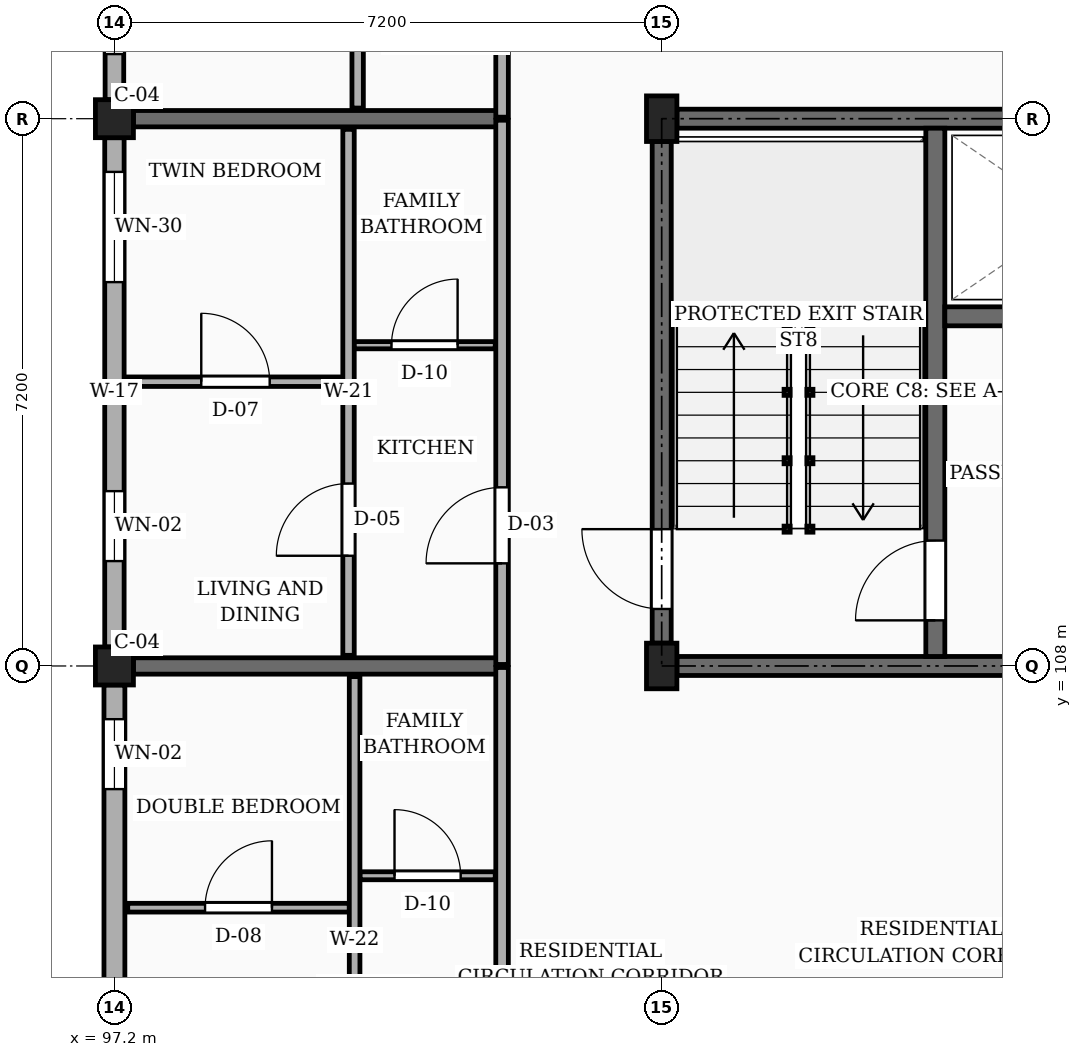
"""IFC4 building model, lengths in metres.
Left out: names, types, materials, properties, quantities, classifications, styles, units other than length and angle.
Written with IfcOpenShell. Run it as: python <this file> out.ifc"""

import sys

from ifc_helpers import new_model, si_unit, direction, frame, frame_2d, origin, origin_2d, place, context, subcontext, project, spatial, rectangle, extrude, element, fill, save


model = new_model("IFC4")
c1 = context("Model", 3, precision=1e-05, world=origin(), true_north=direction((0.0, 1.0)))
c2 = subcontext(c1, "Body", "Model", "MODEL_VIEW")
j1 = project(units=[si_unit("LENGTHUNIT", "METRE"), si_unit("PLANEANGLEUNIT", "RADIAN")], contexts=[c1])
p1 = place(None, origin())
s1 = spatial("IfcSite", under=j1, at=p1, CompositionType="ELEMENT")
p2 = place(p1, origin())
s2 = spatial("IfcBuilding", under=s1, at=p2, CompositionType="ELEMENT")
p3 = place(p2, frame((0.0, 0.0, 29.7)))
s3 = spatial("IfcBuildingStorey", under=s2, at=p3, CompositionType="ELEMENT", Elevation=29.7)
for number, where, z_axis, x_axis in (
    (1, (97.2, 108.0, 0.0), (0.0, 0.0, 1.0), (1.0, 0.0, 0.0)),
    (2, (97.2, 115.2, 0.0), (0.0, 0.0, 1.0), (1.0, 0.0, 0.0)),
):
    element("IfcColumn", number, at=place(p3, frame(where, z_axis=z_axis, x_axis=x_axis)), inside=s3, PredefinedType="COLUMN", context=c2, shape_type="SweptSolid", body=[
        extrude(rectangle(XDim=0.5, YDim=0.5, at=origin_2d()), origin(), (0.0, 0.0, 1.0), 3.15),
    ])
for number, where, z_axis, x_axis in (
    (3, (104.4, 108.0, 0.0), (0.0, 0.0, 1.0), (1.0, 0.0, 0.0)),
    (4, (104.4, 115.2, 0.0), (0.0, 0.0, 1.0), (1.0, 0.0, 0.0)),
):
    element("IfcColumn", number, at=place(p3, frame(where, z_axis=z_axis, x_axis=x_axis)), inside=s3, PredefinedType="COLUMN", context=c2, shape_type="SweptSolid", body=[
        extrude(rectangle(XDim=0.4, YDim=0.6, at=origin_2d()), origin(), (0.0, 0.0, 1.0), 3.15),
    ])
for number, where, z_axis, x_axis in (
    (5, (97.45, 108.0, 0.0), (0.0, 0.0, 1.0), (1.0, 0.0, 0.0)),
    (6, (97.45, 115.2, 0.0), (0.0, 0.0, 1.0), (1.0, 0.0, 0.0)),
):
    element("IfcWall", number, at=place(p3, frame(where, z_axis=z_axis, x_axis=x_axis)), inside=s3, PredefinedType="SOLIDWALL", context=c2, shape_type="SweptSolid", body=[
        extrude(rectangle(XDim=4.85, YDim=0.215, at=frame_2d((2.425, 0.0))), origin(), (0.0, 0.0, 1.0), 2.19),
    ])
p4 = place(p3, frame((97.2, 122.15, 0.0), z_axis=(0.0, 0.0, 1.0), x_axis=(0.0, -1.0, 0.0)))
e7 = element("IfcWall", 7, at=p4, inside=s3, PredefinedType="SOLIDWALL", context=c2, shape_type="SweptSolid", body=[
    extrude(rectangle(XDim=6.7, YDim=0.245, at=frame_2d((3.35, 0.0))), origin(), (0.0, 0.0, 1.0), 2.46),
])
p5 = place(p4, frame((0.45, 0.0, 0.78)))
e8 = element("IfcOpeningElement", 8, at=p5, cuts=e7, PredefinedType="OPENING", context=c2, shape_type="SweptSolid", body=[
    extrude(rectangle(XDim=1.25, YDim=1.44, at=frame_2d((0.625, 0.72))), frame((0.0, 0.133, 0.0), z_axis=(0.0, -1.0, 0.0), x_axis=(1.0, 0.0, 0.0)), (0.0, 0.0, 1.0), 0.265),
])
p6 = place(p4, frame((4.65, 0.0, 0.78)))
e9 = element("IfcOpeningElement", 9, at=p6, cuts=e7, PredefinedType="OPENING", context=c2, shape_type="SweptSolid", body=[
    extrude(rectangle(XDim=1.45, YDim=1.44, at=frame_2d((0.725, 0.72))), frame((0.0, 0.133, 0.0), z_axis=(0.0, -1.0, 0.0), x_axis=(1.0, 0.0, 0.0)), (0.0, 0.0, 1.0), 0.265),
])
p7 = place(p3, frame((97.2, 114.95, 0.0), z_axis=(0.0, 0.0, 1.0), x_axis=(0.0, -1.0, 0.0)))
e10 = element("IfcWall", 10, at=p7, inside=s3, PredefinedType="SOLIDWALL", context=c2, shape_type="SweptSolid", body=[
    extrude(rectangle(XDim=6.7, YDim=0.255, at=frame_2d((3.35, 0.0))), origin(), (0.0, 0.0, 1.0), 2.46),
])
p8 = place(p7, frame((0.45, 0.0, 0.78)))
e11 = element("IfcOpeningElement", 11, at=p8, cuts=e10, PredefinedType="OPENING", context=c2, shape_type="SweptSolid", body=[
    extrude(rectangle(XDim=1.45, YDim=1.44, at=frame_2d((0.725, 0.72))), frame((0.0, 0.137, 0.0), z_axis=(0.0, -1.0, 0.0), x_axis=(1.0, 0.0, 0.0)), (0.0, 0.0, 1.0), 0.275),
])
p9 = place(p7, frame((4.65, 0.0, 0.78)))
e12 = element("IfcOpeningElement", 12, at=p9, cuts=e10, PredefinedType="OPENING", context=c2, shape_type="SweptSolid", body=[
    extrude(rectangle(XDim=0.92, YDim=1.15, at=frame_2d((0.46, 0.575))), frame((0.0, 0.137, 0.0), z_axis=(0.0, -1.0, 0.0), x_axis=(1.0, 0.0, 0.0)), (0.0, 0.0, 1.0), 0.275),
])
p10 = place(p3, frame((97.2, 107.75, 0.0), z_axis=(0.0, 0.0, 1.0), x_axis=(0.0, -1.0, 0.0)))
e13 = element("IfcWall", 13, at=p10, inside=s3, PredefinedType="SOLIDWALL", context=c2, shape_type="SweptSolid", body=[
    extrude(rectangle(XDim=6.7, YDim=0.275, at=frame_2d((3.35, 0.0))), origin(), (0.0, 0.0, 1.0), 2.46),
])
p11 = place(p10, frame((0.45, 0.0, 0.78)))
e14 = element("IfcOpeningElement", 14, at=p11, cuts=e13, PredefinedType="OPENING", context=c2, shape_type="SweptSolid", body=[
    extrude(rectangle(XDim=0.92, YDim=1.15, at=frame_2d((0.46, 0.575))), frame((0.0, 0.147, 0.0), z_axis=(0.0, -1.0, 0.0), x_axis=(1.0, 0.0, 0.0)), (0.0, 0.0, 1.0), 0.295),
])
p12 = place(p10, frame((4.65, 0.0, 0.78)))
e15 = element("IfcOpeningElement", 15, at=p12, cuts=e13, PredefinedType="OPENING", context=c2, shape_type="SweptSolid", body=[
    extrude(rectangle(XDim=1.08, YDim=1.15, at=frame_2d((0.54, 0.575))), frame((0.0, 0.147, 0.0), z_axis=(0.0, -1.0, 0.0), x_axis=(1.0, 0.0, 0.0)), (0.0, 0.0, 1.0), 0.295),
])
p13 = place(p3, frame((104.4, 108.3, 0.0), z_axis=(0.0, 0.0, 1.0), x_axis=(0.0, 1.0, 0.0)))
e16 = element("IfcWall", 16, at=p13, inside=s3, PredefinedType="SHEAR", context=c2, shape_type="SweptSolid", body=[
    extrude(rectangle(XDim=6.6, YDim=0.25, at=frame_2d((3.3, 0.0))), origin(), (0.0, 0.0, 1.0), 2.89),
])
p14 = place(p13, frame((0.45, 0.0, 0.0)))
e17 = element("IfcOpeningElement", 17, at=p14, cuts=e16, PredefinedType="OPENING", context=c2, shape_type="SweptSolid", body=[
    extrude(rectangle(XDim=1.05, YDim=2.15, at=frame_2d((0.525, 1.075))), frame((0.0, 0.135, 0.0), z_axis=(0.0, -1.0, 0.0), x_axis=(1.0, 0.0, 0.0)), (0.0, 0.0, 1.0), 0.27),
])
p15 = place(p3, frame((104.6, 115.2, 0.0), z_axis=(0.0, 0.0, 1.0), x_axis=(1.0, 0.0, 0.0)))
e18 = element("IfcWall", 18, at=p15, inside=s3, PredefinedType="SHEAR", context=c2, shape_type="SweptSolid", body=[
    extrude(rectangle(XDim=6.8, YDim=0.25, at=frame_2d((3.4, 0.0))), origin(), (0.0, 0.0, 1.0), 2.89),
])
p16 = place(p3, frame((104.6, 108.0, 0.0), z_axis=(0.0, 0.0, 1.0), x_axis=(1.0, 0.0, 0.0)))
e19 = element("IfcWall", 19, at=p16, inside=s3, PredefinedType="SHEAR", context=c2, shape_type="SweptSolid", body=[
    extrude(rectangle(XDim=6.8, YDim=0.25, at=frame_2d((3.4, 0.0))), origin(), (0.0, 0.0, 1.0), 2.89),
])
p17 = place(p16, frame((4.55, 0.0, 0.0)))
e20 = element("IfcOpeningElement", 20, at=p17, cuts=e19, PredefinedType="OPENING", context=c2, shape_type="SweptSolid", body=[
    extrude(rectangle(XDim=1.1, YDim=2.15, at=frame_2d((0.55, 1.075))), frame((0.0, 0.135, 0.0), z_axis=(0.0, -1.0, 0.0), x_axis=(1.0, 0.0, 0.0)), (0.0, 0.0, 1.0), 0.27),
])
p18 = place(p3, frame((108.0, 108.125, 0.0), z_axis=(0.0, 0.0, 1.0), x_axis=(0.0, 1.0, 0.0)))
e21 = element("IfcWall", 21, at=p18, inside=s3, PredefinedType="SHEAR", context=c2, shape_type="SweptSolid", body=[
    extrude(rectangle(XDim=6.95, YDim=0.25, at=frame_2d((3.475, 0.0))), origin(), (0.0, 0.0, 1.0), 2.89),
])
p19 = place(p18, frame((0.475, 0.0, 0.0)))
e22 = element("IfcOpeningElement", 22, at=p19, cuts=e21, PredefinedType="OPENING", context=c2, shape_type="SweptSolid", body=[
    extrude(rectangle(XDim=1.05, YDim=2.15, at=frame_2d((0.525, 1.075))), frame((0.0, 0.135, 0.0), z_axis=(0.0, -1.0, 0.0), x_axis=(1.0, 0.0, 0.0)), (0.0, 0.0, 1.0), 0.27),
])
p20 = place(p3, frame((108.125, 112.6, 0.0), z_axis=(0.0, 0.0, 1.0), x_axis=(1.0, 0.0, 0.0)))
e23 = element("IfcWall", 23, at=p20, inside=s3, PredefinedType="SHEAR", context=c2, shape_type="SweptSolid", body=[
    extrude(rectangle(XDim=3.35, YDim=0.25, at=frame_2d((1.675, 0.0))), origin(), (0.0, 0.0, 1.0), 2.89),
])
p21 = place(p20, frame((1.1, 0.0, 0.0)))
e24 = element("IfcOpeningElement", 24, at=p21, cuts=e23, PredefinedType="OPENING", context=c2, shape_type="SweptSolid", body=[
    extrude(rectangle(XDim=1.0, YDim=2.2, at=frame_2d((0.5, 1.1))), frame((0.0, 0.135, 0.0), z_axis=(0.0, -1.0, 0.0), x_axis=(1.0, 0.0, 0.0)), (0.0, 0.0, 1.0), 0.27),
])
p22 = place(p3, frame((102.3, 100.82, 0.0), z_axis=(0.0, 0.0, 1.0), x_axis=(0.0, 1.0, 0.0)))
e25 = element("IfcWall", 25, at=p22, inside=s3, PredefinedType="PARTITIONING", context=c2, shape_type="SweptSolid", body=[
    extrude(rectangle(XDim=7.16, YDim=0.165, at=frame_2d((3.58, 0.0))), origin(), (0.0, 0.0, 1.0), 2.325),
])
p23 = place(p22, frame((1.33, 0.0, 0.0)))
e26 = element("IfcOpeningElement", 26, at=p23, cuts=e25, PredefinedType="OPENING", context=c2, shape_type="SweptSolid", body=[
    extrude(rectangle(XDim=1.14, YDim=2.18, at=frame_2d((0.57, 1.09))), frame((0.0, 0.093, 0.0), z_axis=(0.0, -1.0, 0.0), x_axis=(1.0, 0.0, 0.0)), (0.0, 0.0, 1.0), 0.185),
])
p24 = place(p3, frame((102.3, 108.02, 0.0), z_axis=(0.0, 0.0, 1.0), x_axis=(0.0, 1.0, 0.0)))
e27 = element("IfcWall", 27, at=p24, inside=s3, PredefinedType="PARTITIONING", context=c2, shape_type="SweptSolid", body=[
    extrude(rectangle(XDim=7.16, YDim=0.165, at=frame_2d((3.58, 0.0))), origin(), (0.0, 0.0, 1.0), 2.325),
])
p25 = place(p24, frame((1.33, 0.0, 0.0)))
e28 = element("IfcOpeningElement", 28, at=p25, cuts=e27, PredefinedType="OPENING", context=c2, shape_type="SweptSolid", body=[
    extrude(rectangle(XDim=1.0, YDim=2.15, at=frame_2d((0.5, 1.075))), frame((0.0, 0.093, 0.0), z_axis=(0.0, -1.0, 0.0), x_axis=(1.0, 0.0, 0.0)), (0.0, 0.0, 1.0), 0.185),
])
p26 = place(p3, frame((102.3, 115.22, 0.0), z_axis=(0.0, 0.0, 1.0), x_axis=(0.0, 1.0, 0.0)))
e29 = element("IfcWall", 29, at=p26, inside=s3, PredefinedType="PARTITIONING", context=c2, shape_type="SweptSolid", body=[
    extrude(rectangle(XDim=7.16, YDim=0.165, at=frame_2d((3.58, 0.0))), origin(), (0.0, 0.0, 1.0), 2.325),
])
p27 = place(p26, frame((4.78, 0.0, 0.0)))
e30 = element("IfcOpeningElement", 30, at=p27, cuts=e29, PredefinedType="OPENING", context=c2, shape_type="SweptSolid", body=[
    extrude(rectangle(XDim=0.94, YDim=2.12, at=frame_2d((0.47, 1.06))), frame((0.0, 0.093, 0.0), z_axis=(0.0, -1.0, 0.0), x_axis=(1.0, 0.0, 0.0)), (0.0, 0.0, 1.0), 0.185),
])
p28 = place(p3, frame((97.375, 104.82, 0.0), z_axis=(0.0, 0.0, 1.0), x_axis=(1.0, 0.0, 0.0)))
e31 = element("IfcWall", 31, at=p28, inside=s3, PredefinedType="PARTITIONING", context=c2, shape_type="SweptSolid", body=[
    extrude(rectangle(XDim=2.915, YDim=0.115, at=frame_2d((1.458, 0.0))), origin(), (0.0, 0.0, 1.0), 2.325),
])
p29 = place(p28, frame((1.018, 0.0, 0.0)))
e32 = element("IfcOpeningElement", 32, at=p29, cuts=e31, PredefinedType="OPENING", context=c2, shape_type="SweptSolid", body=[
    extrude(rectangle(XDim=0.88, YDim=2.08, at=frame_2d((0.44, 1.04))), frame((0.0, 0.067, 0.0), z_axis=(0.0, -1.0, 0.0), x_axis=(1.0, 0.0, 0.0)), (0.0, 0.0, 1.0), 0.135),
])
p30 = place(p3, frame((100.43, 105.24, 0.0), z_axis=(0.0, 0.0, 1.0), x_axis=(1.0, 0.0, 0.0)))
e33 = element("IfcWall", 33, at=p30, inside=s3, PredefinedType="PARTITIONING", context=c2, shape_type="SweptSolid", body=[
    extrude(rectangle(XDim=1.78, YDim=0.105, at=frame_2d((0.89, 0.0))), origin(), (0.0, 0.0, 1.0), 2.325),
])
p31 = place(p30, frame((0.455, 0.0, 0.0)))
e34 = element("IfcOpeningElement", 34, at=p31, cuts=e33, PredefinedType="OPENING", context=c2, shape_type="SweptSolid", body=[
    extrude(rectangle(XDim=0.87, YDim=2.05, at=frame_2d((0.435, 1.025))), frame((0.0, 0.062, 0.0), z_axis=(0.0, -1.0, 0.0), x_axis=(1.0, 0.0, 0.0)), (0.0, 0.0, 1.0), 0.125),
])
p32 = place(p3, frame((100.36, 100.94, 0.0), z_axis=(0.0, 0.0, 1.0), x_axis=(0.0, 1.0, 0.0)))
e35 = element("IfcWall", 35, at=p32, inside=s3, PredefinedType="PARTITIONING", context=c2, shape_type="SweptSolid", body=[
    extrude(rectangle(XDim=6.92, YDim=0.14, at=frame_2d((3.46, 0.0))), origin(), (0.0, 0.0, 1.0), 2.325),
])
p33 = place(p32, frame((1.31, 0.0, 0.0)))
e36 = element("IfcOpeningElement", 36, at=p33, cuts=e35, PredefinedType="OPENING", context=c2, shape_type="SweptSolid", body=[
    extrude(rectangle(XDim=0.92, YDim=2.1, at=frame_2d((0.46, 1.05))), frame((0.0, 0.08, 0.0), z_axis=(0.0, -1.0, 0.0), x_axis=(1.0, 0.0, 0.0)), (0.0, 0.0, 1.0), 0.16),
])
p34 = place(p3, frame((97.375, 111.74, 0.0), z_axis=(0.0, 0.0, 1.0), x_axis=(1.0, 0.0, 0.0)))
e37 = element("IfcWall", 37, at=p34, inside=s3, PredefinedType="PARTITIONING", context=c2, shape_type="SweptSolid", body=[
    extrude(rectangle(XDim=2.835, YDim=0.125, at=frame_2d((1.417, 0.0))), origin(), (0.0, 0.0, 1.0), 2.325),
])
p35 = place(p34, frame((0.968, 0.0, 0.0)))
e38 = element("IfcOpeningElement", 38, at=p35, cuts=e37, PredefinedType="OPENING", context=c2, shape_type="SweptSolid", body=[
    extrude(rectangle(XDim=0.9, YDim=2.1, at=frame_2d((0.45, 1.05))), frame((0.0, 0.073, 0.0), z_axis=(0.0, -1.0, 0.0), x_axis=(1.0, 0.0, 0.0)), (0.0, 0.0, 1.0), 0.145),
])
p36 = place(p3, frame((100.35, 112.22, 0.0), z_axis=(0.0, 0.0, 1.0), x_axis=(1.0, 0.0, 0.0)))
e39 = element("IfcWall", 39, at=p36, inside=s3, PredefinedType="PARTITIONING", context=c2, shape_type="SweptSolid", body=[
    extrude(rectangle(XDim=1.86, YDim=0.095, at=frame_2d((0.93, 0.0))), origin(), (0.0, 0.0, 1.0), 2.325),
])
p37 = place(p36, frame((0.495, 0.0, 0.0)))
e40 = element("IfcOpeningElement", 40, at=p37, cuts=e39, PredefinedType="OPENING", context=c2, shape_type="SweptSolid", body=[
    extrude(rectangle(XDim=0.87, YDim=2.05, at=frame_2d((0.435, 1.025))), frame((0.0, 0.058, 0.0), z_axis=(0.0, -1.0, 0.0), x_axis=(1.0, 0.0, 0.0)), (0.0, 0.0, 1.0), 0.115),
])
p38 = place(p3, frame((100.28, 108.14, 0.0), z_axis=(0.0, 0.0, 1.0), x_axis=(0.0, 1.0, 0.0)))
e41 = element("IfcWall", 41, at=p38, inside=s3, PredefinedType="PARTITIONING", context=c2, shape_type="SweptSolid", body=[
    extrude(rectangle(XDim=6.92, YDim=0.15, at=frame_2d((3.46, 0.0))), origin(), (0.0, 0.0, 1.0), 2.325),
])
p39 = place(p38, frame((1.31, 0.0, 0.0)))
e42 = element("IfcOpeningElement", 42, at=p39, cuts=e41, PredefinedType="OPENING", context=c2, shape_type="SweptSolid", body=[
    extrude(rectangle(XDim=0.95, YDim=2.1, at=frame_2d((0.475, 1.05))), frame((0.0, 0.085, 0.0), z_axis=(0.0, -1.0, 0.0), x_axis=(1.0, 0.0, 0.0)), (0.0, 0.0, 1.0), 0.17),
])
p40 = place(p3, frame((100.4, 115.34, 0.0), z_axis=(0.0, 0.0, 1.0), x_axis=(0.0, 1.0, 0.0)))
e43 = element("IfcWall", 43, at=p40, inside=s3, PredefinedType="PARTITIONING", context=c2, shape_type="SweptSolid", body=[
    extrude(rectangle(XDim=6.92, YDim=0.15, at=frame_2d((3.46, 0.0))), origin(), (0.0, 0.0, 1.0), 2.325),
])
p41 = place(p40, frame((4.66, 0.0, 0.0)))
e44 = element("IfcOpeningElement", 44, at=p41, cuts=e43, PredefinedType="OPENING", context=c2, shape_type="SweptSolid", body=[
    extrude(rectangle(XDim=0.92, YDim=2.1, at=frame_2d((0.46, 1.05))), frame((0.0, 0.085, 0.0), z_axis=(0.0, -1.0, 0.0), x_axis=(1.0, 0.0, 0.0)), (0.0, 0.0, 1.0), 0.17),
])
p42 = place(p6, origin())
e45 = element("IfcWindow", 45, at=p42, inside=s3, PartitioningType="SINGLE_PANEL", PredefinedType="WINDOW", context=c2, shape_type="SweptSolid", body=[
    extrude(rectangle(XDim=1.45, YDim=1.44, at=frame_2d((0.725, 0.72))), frame((0.0, 0.03, 0.0), z_axis=(0.0, -1.0, 0.0), x_axis=(1.0, 0.0, 0.0)), (0.0, 0.0, 1.0), 0.06),
])
fill(e9, e45)
p43 = place(p8, origin())
e46 = element("IfcWindow", 46, at=p43, inside=s3, PartitioningType="SINGLE_PANEL", PredefinedType="WINDOW", context=c2, shape_type="SweptSolid", body=[
    extrude(rectangle(XDim=1.45, YDim=1.44, at=frame_2d((0.725, 0.72))), frame((0.0, 0.03, 0.0), z_axis=(0.0, -1.0, 0.0), x_axis=(1.0, 0.0, 0.0)), (0.0, 0.0, 1.0), 0.06),
])
fill(e11, e46)
p44 = place(p9, origin())
e47 = element("IfcWindow", 47, at=p44, inside=s3, PartitioningType="SINGLE_PANEL", PredefinedType="WINDOW", context=c2, shape_type="SweptSolid", body=[
    extrude(rectangle(XDim=0.92, YDim=1.15, at=frame_2d((0.46, 0.575))), frame((0.0, 0.03, 0.0), z_axis=(0.0, -1.0, 0.0), x_axis=(1.0, 0.0, 0.0)), (0.0, 0.0, 1.0), 0.06),
])
fill(e12, e47)
p45 = place(p11, origin())
e48 = element("IfcWindow", 48, at=p45, inside=s3, PartitioningType="SINGLE_PANEL", PredefinedType="WINDOW", context=c2, shape_type="SweptSolid", body=[
    extrude(rectangle(XDim=0.92, YDim=1.15, at=frame_2d((0.46, 0.575))), frame((0.0, 0.03, 0.0), z_axis=(0.0, -1.0, 0.0), x_axis=(1.0, 0.0, 0.0)), (0.0, 0.0, 1.0), 0.06),
])
fill(e14, e48)
p46 = place(p14, origin())
e49 = element("IfcDoor", 49, at=p46, inside=s3, OperationType="SINGLE_SWING_RIGHT", PredefinedType="DOOR", context=c2, shape_type="SweptSolid", body=[
    extrude(rectangle(XDim=1.05, YDim=2.15, at=frame_2d((0.525, 1.075))), frame((0.0, 0.025, 0.0), z_axis=(0.0, -1.0, 0.0), x_axis=(1.0, 0.0, 0.0)), (0.0, 0.0, 1.0), 0.05),
])
fill(e17, e49)
p47 = place(p19, origin())
e50 = element("IfcDoor", 50, at=p47, inside=s3, OperationType="SINGLE_SWING_LEFT", PredefinedType="DOOR", context=c2, shape_type="SweptSolid", body=[
    extrude(rectangle(XDim=1.05, YDim=2.15, at=frame_2d((0.525, 1.075))), frame((0.0, 0.025, 0.0), z_axis=(0.0, -1.0, 0.0), x_axis=(1.0, 0.0, 0.0)), (0.0, 0.0, 1.0), 0.05),
])
fill(e22, e50)
p48 = place(p25, origin())
e51 = element("IfcDoor", 51, at=p48, inside=s3, OperationType="SINGLE_SWING_LEFT", PredefinedType="DOOR", context=c2, shape_type="SweptSolid", body=[
    extrude(rectangle(XDim=1.0, YDim=2.15, at=frame_2d((0.5, 1.075))), frame((0.0, 0.025, 0.0), z_axis=(0.0, -1.0, 0.0), x_axis=(1.0, 0.0, 0.0)), (0.0, 0.0, 1.0), 0.05),
])
fill(e28, e51)
p49 = place(p29, origin())
e52 = element("IfcDoor", 52, at=p49, inside=s3, OperationType="SINGLE_SWING_RIGHT", PredefinedType="DOOR", context=c2, shape_type="SweptSolid", body=[
    extrude(rectangle(XDim=0.88, YDim=2.08, at=frame_2d((0.44, 1.04))), frame((0.0, 0.025, 0.0), z_axis=(0.0, -1.0, 0.0), x_axis=(1.0, 0.0, 0.0)), (0.0, 0.0, 1.0), 0.05),
])
fill(e32, e52)
p50 = place(p31, origin())
e53 = element("IfcDoor", 53, at=p50, inside=s3, OperationType="SINGLE_SWING_LEFT", PredefinedType="DOOR", context=c2, shape_type="SweptSolid", body=[
    extrude(rectangle(XDim=0.87, YDim=2.05, at=frame_2d((0.435, 1.025))), frame((0.0, 0.025, 0.0), z_axis=(0.0, -1.0, 0.0), x_axis=(1.0, 0.0, 0.0)), (0.0, 0.0, 1.0), 0.05),
])
fill(e34, e53)
p51 = place(p35, origin())
e54 = element("IfcDoor", 54, at=p51, inside=s3, OperationType="SINGLE_SWING_LEFT", PredefinedType="DOOR", context=c2, shape_type="SweptSolid", body=[
    extrude(rectangle(XDim=0.9, YDim=2.1, at=frame_2d((0.45, 1.05))), frame((0.0, 0.025, 0.0), z_axis=(0.0, -1.0, 0.0), x_axis=(1.0, 0.0, 0.0)), (0.0, 0.0, 1.0), 0.05),
])
fill(e38, e54)
p52 = place(p37, origin())
e55 = element("IfcDoor", 55, at=p52, inside=s3, OperationType="SINGLE_SWING_RIGHT", PredefinedType="DOOR", context=c2, shape_type="SweptSolid", body=[
    extrude(rectangle(XDim=0.87, YDim=2.05, at=frame_2d((0.435, 1.025))), frame((0.0, 0.025, 0.0), z_axis=(0.0, -1.0, 0.0), x_axis=(1.0, 0.0, 0.0)), (0.0, 0.0, 1.0), 0.05),
])
fill(e40, e55)
p53 = place(p39, origin())
e56 = element("IfcDoor", 56, at=p53, inside=s3, OperationType="SINGLE_SWING_LEFT", PredefinedType="DOOR", context=c2, shape_type="SweptSolid", body=[
    extrude(rectangle(XDim=0.95, YDim=2.1, at=frame_2d((0.475, 1.05))), frame((0.0, 0.025, 0.0), z_axis=(0.0, -1.0, 0.0), x_axis=(1.0, 0.0, 0.0)), (0.0, 0.0, 1.0), 0.05),
])
fill(e42, e56)
save(model, sys.argv[1])
